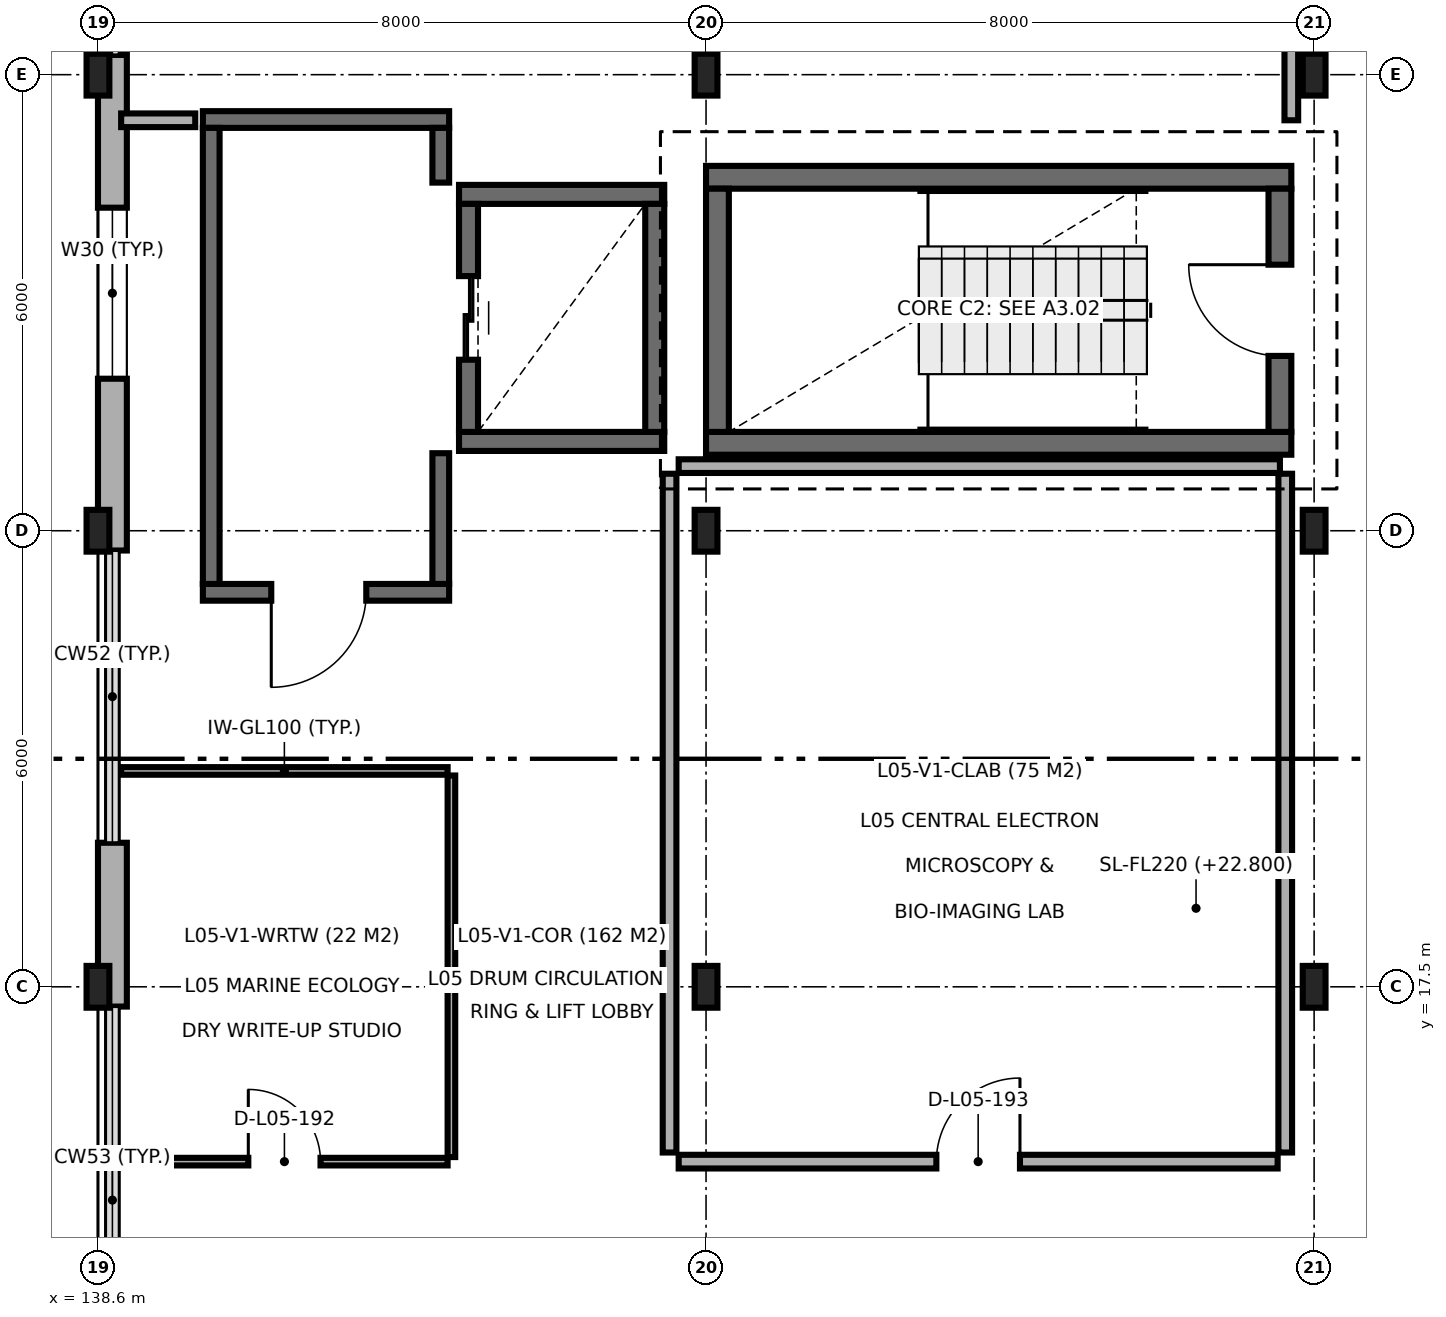
"""IFC4 building model, lengths in metres.
Left out: names, types, materials, properties, quantities, classifications, styles, units other than length and angle.
Written with IfcOpenShell. Run it as: python <this file> out.ifc"""

import sys

from ifc_helpers import new_model, si_unit, direction, frame, frame_2d, origin, origin_2d, place, context, subcontext, project, spatial, rectangle, i_section, extrude, element, fill, save


model = new_model("IFC4")
c1 = context("Model", 3, precision=1e-05, world=origin(), true_north=direction((0.0, 1.0)))
c2 = subcontext(c1, "Body", "Model", "MODEL_VIEW")
j1 = project(units=[si_unit("LENGTHUNIT", "METRE"), si_unit("PLANEANGLEUNIT", "RADIAN")], contexts=[c1])
p1 = place(None, origin())
s1 = spatial("IfcSite", under=j1, at=p1, CompositionType="ELEMENT")
p2 = place(p1, origin())
s2 = spatial("IfcBuilding", under=s1, at=p2, CompositionType="ELEMENT")
p3 = place(p2, frame((0.0, 0.0, 22.8)))
s3 = spatial("IfcBuildingStorey", under=s2, at=p3, CompositionType="ELEMENT", Elevation=22.8)
for number, where, z_axis, x_axis in (
    (1, (138.6, 17.5, 0.0), (0.0, 0.0, 1.0), (1.0, 0.0, 0.0)),
    (2, (138.6, 23.5, 0.0), (0.0, 0.0, 1.0), (1.0, 0.0, 0.0)),
    (3, (138.6, 29.5, 0.0), (0.0, 0.0, 1.0), (1.0, 0.0, 0.0)),
    (4, (146.6, 17.5, 0.0), (0.0, 0.0, 1.0), (1.0, 0.0, 0.0)),
    (5, (146.6, 23.5, 0.0), (0.0, 0.0, 1.0), (1.0, 0.0, 0.0)),
    (6, (146.6, 29.5, 0.0), (0.0, 0.0, 1.0), (1.0, 0.0, 0.0)),
    (7, (154.6, 17.5, 0.0), (0.0, 0.0, 1.0), (1.0, 0.0, 0.0)),
    (8, (154.6, 23.5, 0.0), (0.0, 0.0, 1.0), (1.0, 0.0, 0.0)),
    (9, (154.6, 29.5, 0.0), (0.0, 0.0, 1.0), (1.0, 0.0, 0.0)),
):
    element("IfcColumn", number, at=place(p3, frame(where, z_axis=z_axis, x_axis=x_axis)), inside=s3, PredefinedType="COLUMN", context=c2, shape_type="SweptSolid", body=[
        extrude(i_section(OverallWidth=0.3, OverallDepth=0.55, WebThickness=0.015, FlangeThickness=0.029, FilletRadius=0.027, at=origin_2d()), origin(), (0.0, 0.0, 1.0), 3.9),
    ])
for number, where, z_axis, x_axis in (
    (10, (146.6, 24.65, 0.0), (0.0, 0.0, 1.0), (1.0, 0.0, 0.0)),
    (11, (154.3, 28.15, 0.0), (0.0, 0.0, 1.0), (-1.0, 0.0, 0.0)),
):
    element("IfcWall", number, at=place(p3, frame(where, z_axis=z_axis, x_axis=x_axis)), inside=s3, PredefinedType="SHEAR", context=c2, shape_type="SweptSolid", body=[
        extrude(rectangle(XDim=7.7, YDim=0.3, at=frame_2d((3.85, 0.0))), origin(), (0.0, 0.0, 1.0), 3.9),
    ])
p4 = place(p3, frame((146.75, 28.0, 0.0), z_axis=(0.0, 0.0, 1.0), x_axis=(0.0, -1.0, 0.0)))
e12 = element("IfcWall", 12, at=p4, inside=s3, PredefinedType="SHEAR", context=c2, shape_type="SweptSolid", body=[
    extrude(rectangle(XDim=3.2, YDim=0.3, at=frame_2d((1.6, 0.0))), origin(), (0.0, 0.0, 1.0), 3.9),
])
p5 = place(p3, frame((154.15, 24.8, 0.0), z_axis=(0.0, 0.0, 1.0), x_axis=(0.0, 1.0, 0.0)))
e13 = element("IfcWall", 13, at=p5, inside=s3, PredefinedType="SHEAR", context=c2, shape_type="SweptSolid", body=[
    extrude(rectangle(XDim=3.2, YDim=0.3, at=frame_2d((1.6, 0.0))), origin(), (0.0, 0.0, 1.0), 3.9),
])
p6 = place(p5, frame((1.0, 0.0, 0.0)))
e14 = element("IfcOpeningElement", 14, at=p6, cuts=e13, PredefinedType="OPENING", context=c2, shape_type="SweptSolid", body=[
    extrude(rectangle(XDim=1.2, YDim=2.15, at=frame_2d((0.6, 1.075))), frame((0.0, 0.16, 0.0), z_axis=(0.0, -1.0, 0.0), x_axis=(1.0, 0.0, 0.0)), (0.0, 0.0, 1.0), 0.32),
])
for number, where, z_axis, x_axis in (
    (15, (143.35, 24.675, 0.0), (0.0, 0.0, 1.0), (1.0, 0.0, 0.0)),
    (16, (146.05, 27.925, 0.0), (0.0, 0.0, 1.0), (-1.0, 0.0, 0.0)),
):
    element("IfcWall", number, at=place(p3, frame(where, z_axis=z_axis, x_axis=x_axis)), inside=s3, PredefinedType="SHEAR", context=c2, shape_type="SweptSolid", body=[
        extrude(rectangle(XDim=2.7, YDim=0.25, at=frame_2d((1.35, 0.0))), origin(), (0.0, 0.0, 1.0), 3.9),
    ])
p7 = place(p3, frame((143.475, 27.8, 0.0), z_axis=(0.0, 0.0, 1.0), x_axis=(0.0, -1.0, 0.0)))
e17 = element("IfcWall", 17, at=p7, inside=s3, PredefinedType="SHEAR", context=c2, shape_type="SweptSolid", body=[
    extrude(rectangle(XDim=3.0, YDim=0.25, at=frame_2d((1.5, 0.0))), origin(), (0.0, 0.0, 1.0), 3.9),
])
p8 = place(p7, frame((0.95, 0.0, 0.0)))
e18 = element("IfcOpeningElement", 18, at=p8, cuts=e17, PredefinedType="OPENING", context=c2, shape_type="SweptSolid", body=[
    extrude(rectangle(XDim=1.1, YDim=2.15, at=frame_2d((0.55, 1.075))), frame((0.0, 0.135, 0.0), z_axis=(0.0, -1.0, 0.0), x_axis=(1.0, 0.0, 0.0)), (0.0, 0.0, 1.0), 0.27),
])
p9 = place(p3, frame((145.925, 24.8, 0.0), z_axis=(0.0, 0.0, 1.0), x_axis=(0.0, 1.0, 0.0)))
e19 = element("IfcWall", 19, at=p9, inside=s3, PredefinedType="SHEAR", context=c2, shape_type="SweptSolid", body=[
    extrude(rectangle(XDim=3.0, YDim=0.25, at=frame_2d((1.5, 0.0))), origin(), (0.0, 0.0, 1.0), 3.9),
])
p10 = place(p3, frame((139.98, 22.69, 0.0), z_axis=(0.0, 0.0, 1.0), x_axis=(1.0, 0.0, 0.0)))
e20 = element("IfcWall", 20, at=p10, inside=s3, PredefinedType="SOLIDWALL", context=c2, shape_type="SweptSolid", body=[
    extrude(rectangle(XDim=3.24, YDim=0.22, at=frame_2d((1.62, 0.0))), origin(), (0.0, 0.0, 1.0), 3.68),
])
p11 = place(p10, frame((0.9, 0.0, 0.0)))
e21 = element("IfcOpeningElement", 21, at=p11, cuts=e20, PredefinedType="OPENING", context=c2, shape_type="SweptSolid", body=[
    extrude(rectangle(XDim=1.25, YDim=2.15, at=frame_2d((0.625, 1.075))), frame((0.0, 0.12, 0.0), z_axis=(0.0, -1.0, 0.0), x_axis=(1.0, 0.0, 0.0)), (0.0, 0.0, 1.0), 0.24),
])
p12 = place(p3, frame((143.22, 28.91, 0.0), z_axis=(0.0, 0.0, 1.0), x_axis=(-1.0, 0.0, 0.0)))
e22 = element("IfcWall", 22, at=p12, inside=s3, PredefinedType="SOLIDWALL", context=c2, shape_type="SweptSolid", body=[
    extrude(rectangle(XDim=3.24, YDim=0.22, at=frame_2d((1.62, 0.0))), origin(), (0.0, 0.0, 1.0), 3.68),
])
p13 = place(p3, frame((140.09, 28.8, 0.0), z_axis=(0.0, 0.0, 1.0), x_axis=(0.0, -1.0, 0.0)))
e23 = element("IfcWall", 23, at=p13, inside=s3, PredefinedType="SOLIDWALL", context=c2, shape_type="SweptSolid", body=[
    extrude(rectangle(XDim=6.0, YDim=0.22, at=frame_2d((3.0, 0.0))), origin(), (0.0, 0.0, 1.0), 3.68),
])
p14 = place(p3, frame((143.11, 22.8, 0.0), z_axis=(0.0, 0.0, 1.0), x_axis=(0.0, 1.0, 0.0)))
e24 = element("IfcWall", 24, at=p14, inside=s3, PredefinedType="SOLIDWALL", context=c2, shape_type="SweptSolid", body=[
    extrude(rectangle(XDim=1.72, YDim=0.22, at=frame_2d((0.86, 0.0))), origin(), (0.0, 0.0, 1.0), 3.68),
])
p15 = place(p3, frame((143.11, 28.08, 0.0), z_axis=(0.0, 0.0, 1.0), x_axis=(0.0, 1.0, 0.0)))
e25 = element("IfcWall", 25, at=p15, inside=s3, PredefinedType="SOLIDWALL", context=c2, shape_type="SweptSolid", body=[
    extrude(rectangle(XDim=0.72, YDim=0.22, at=frame_2d((0.36, 0.0))), origin(), (0.0, 0.0, 1.0), 3.68),
])
p16 = place(p3, frame((138.79, 29.76, 0.0), z_axis=(0.0, 0.0, 1.0), x_axis=(0.0, -1.0, 0.0)))
e26 = element("IfcWall", 26, at=p16, inside=s3, PredefinedType="SOLIDWALL", context=c2, shape_type="SweptSolid", body=[
    extrude(rectangle(XDim=6.52, YDim=0.38, at=frame_2d((3.26, 0.0))), origin(), (0.0, 0.0, 1.0), 3.68),
])
p17 = place(p16, frame((2.01, 0.0, 0.9)))
e27 = element("IfcOpeningElement", 27, at=p17, cuts=e26, PredefinedType="OPENING", context=c2, shape_type="SweptSolid", body=[
    extrude(rectangle(XDim=2.25, YDim=1.95, at=frame_2d((1.125, 0.975))), frame((0.0, 0.2, 0.0), z_axis=(0.0, -1.0, 0.0), x_axis=(1.0, 0.0, 0.0)), (0.0, 0.0, 1.0), 0.4),
])
p18 = place(p3, frame((138.79, 19.395, 0.0), z_axis=(0.0, 0.0, 1.0), x_axis=(0.0, -1.0, 0.0)))
e28 = element("IfcWall", 28, at=p18, inside=s3, PredefinedType="SOLIDWALL", context=c2, shape_type="SweptSolid", body=[
    extrude(rectangle(XDim=2.155, YDim=0.38, at=frame_2d((1.078, 0.0))), origin(), (0.0, 0.0, 1.0), 3.68),
])
p19 = place(p3, frame((138.905, 20.34, 0.0), z_axis=(0.0, 0.0, 1.0), x_axis=(1.0, 0.0, 0.0)))
e29 = element("IfcWall", 29, at=p19, inside=s3, PredefinedType="PARTITIONING", context=c2, shape_type="SweptSolid", body=[
    extrude(rectangle(XDim=4.295, YDim=0.1, at=frame_2d((2.147, 0.0))), origin(), (0.0, 0.0, 1.0), 3.68),
])
p20 = place(p3, frame((143.25, 15.26, 0.0), z_axis=(0.0, 0.0, 1.0), x_axis=(0.0, 1.0, 0.0)))
e30 = element("IfcWall", 30, at=p20, inside=s3, PredefinedType="PARTITIONING", context=c2, shape_type="SweptSolid", body=[
    extrude(rectangle(XDim=5.02, YDim=0.1, at=frame_2d((2.51, 0.0))), origin(), (0.0, 0.0, 1.0), 3.68),
])
p21 = place(p3, frame((138.905, 15.2, 0.0), z_axis=(0.0, 0.0, 1.0), x_axis=(1.0, 0.0, 0.0)))
e31 = element("IfcWall", 31, at=p21, inside=s3, PredefinedType="PARTITIONING", context=c2, shape_type="SweptSolid", body=[
    extrude(rectangle(XDim=4.295, YDim=0.1, at=frame_2d((2.147, 0.0))), origin(), (0.0, 0.0, 1.0), 3.68),
])
p22 = place(p21, frame((1.673, 0.0, 0.0)))
e32 = element("IfcOpeningElement", 32, at=p22, cuts=e31, PredefinedType="OPENING", context=c2, shape_type="SweptSolid", body=[
    extrude(rectangle(XDim=0.95, YDim=2.1, at=frame_2d((0.475, 1.05))), frame((0.0, 0.06, 0.0), z_axis=(0.0, -1.0, 0.0), x_axis=(1.0, 0.0, 0.0)), (0.0, 0.0, 1.0), 0.12),
])
p23 = place(p3, frame((146.12, 15.32, 0.0), z_axis=(0.0, 0.0, 1.0), x_axis=(0.0, 1.0, 0.0)))
e33 = element("IfcWall", 33, at=p23, inside=s3, PredefinedType="PARTITIONING", context=c2, shape_type="SweptSolid", body=[
    extrude(rectangle(XDim=8.93, YDim=0.18, at=frame_2d((4.465, 0.0))), origin(), (0.0, 0.0, 1.0), 3.68),
])
p24 = place(p3, frame((146.24, 24.35, 0.0), z_axis=(0.0, 0.0, 1.0), x_axis=(1.0, 0.0, 0.0)))
e34 = element("IfcWall", 34, at=p24, inside=s3, PredefinedType="PARTITIONING", context=c2, shape_type="SweptSolid", body=[
    extrude(rectangle(XDim=7.91, YDim=0.18, at=frame_2d((3.955, 0.0))), origin(), (0.0, 0.0, 1.0), 2.86),
])
p25 = place(p3, frame((154.22, 15.32, 0.0), z_axis=(0.0, 0.0, 1.0), x_axis=(0.0, 1.0, 0.0)))
e35 = element("IfcWall", 35, at=p25, inside=s3, PredefinedType="PARTITIONING", context=c2, shape_type="SweptSolid", body=[
    extrude(rectangle(XDim=8.93, YDim=0.18, at=frame_2d((4.465, 0.0))), origin(), (0.0, 0.0, 1.0), 3.68),
])
p26 = place(p3, frame((146.24, 15.2, 0.0), z_axis=(0.0, 0.0, 1.0), x_axis=(1.0, 0.0, 0.0)))
e36 = element("IfcWall", 36, at=p26, inside=s3, PredefinedType="PARTITIONING", context=c2, shape_type="SweptSolid", body=[
    extrude(rectangle(XDim=7.88, YDim=0.18, at=frame_2d((3.94, 0.0))), origin(), (0.0, 0.0, 1.0), 3.68),
])
p27 = place(p26, frame((3.39, 0.0, 0.0)))
e37 = element("IfcOpeningElement", 37, at=p27, cuts=e36, PredefinedType="OPENING", context=c2, shape_type="SweptSolid", body=[
    extrude(rectangle(XDim=1.1, YDim=2.15, at=frame_2d((0.55, 1.075))), frame((0.0, 0.1, 0.0), z_axis=(0.0, -1.0, 0.0), x_axis=(1.0, 0.0, 0.0)), (0.0, 0.0, 1.0), 0.2),
])
p28 = place(p3, frame((138.905, 28.9, 0.0), z_axis=(0.0, 0.0, 1.0), x_axis=(1.0, 0.0, 0.0)))
e38 = element("IfcWall", 38, at=p28, inside=s3, PredefinedType="PARTITIONING", context=c2, shape_type="SweptSolid", body=[
    extrude(rectangle(XDim=0.975, YDim=0.18, at=frame_2d((0.487, 0.0))), origin(), (0.0, 0.0, 1.0), 3.68),
])
p29 = place(p3, frame((154.3, 28.9, 0.0), z_axis=(0.0, 0.0, 1.0), x_axis=(0.0, 1.0, 0.0)))
e39 = element("IfcWall", 39, at=p29, inside=s3, PredefinedType="PARTITIONING", context=c2, shape_type="SweptSolid", body=[
    extrude(rectangle(XDim=12.295, YDim=0.18, at=frame_2d((6.147, 0.0))), origin(), (0.0, 0.0, 1.0), 3.29),
])
p30 = place(p29, frame((3.918, 0.0, 0.0)))
e40 = element("IfcOpeningElement", 40, at=p30, cuts=e39, PredefinedType="OPENING", context=c2, shape_type="SweptSolid", body=[
    extrude(rectangle(XDim=1.1, YDim=2.15, at=frame_2d((0.55, 1.075))), frame((0.0, 0.1, 0.0), z_axis=(0.0, -1.0, 0.0), x_axis=(1.0, 0.0, 0.0)), (0.0, 0.0, 1.0), 0.2),
])
p31 = place(p6, origin())
e41 = element("IfcDoor", 41, at=p31, inside=s3, OperationType="SINGLE_SWING_RIGHT", PredefinedType="DOOR", context=c2, shape_type="SweptSolid", body=[
    extrude(rectangle(XDim=1.2, YDim=2.15, at=frame_2d((0.6, 1.075))), frame((0.0, 0.025, 0.0), z_axis=(0.0, -1.0, 0.0), x_axis=(1.0, 0.0, 0.0)), (0.0, 0.0, 1.0), 0.05),
])
fill(e14, e41)
p32 = place(p8, origin())
e42 = element("IfcDoor", 42, at=p32, inside=s3, OperationType="DOUBLE_DOOR_SLIDING", PredefinedType="DOOR", context=c2, shape_type="SweptSolid", body=[
    extrude(rectangle(XDim=1.1, YDim=2.15, at=frame_2d((0.55, 1.075))), frame((0.0, 0.025, 0.0), z_axis=(0.0, -1.0, 0.0), x_axis=(1.0, 0.0, 0.0)), (0.0, 0.0, 1.0), 0.05),
])
fill(e18, e42)
p33 = place(p11, frame((1.25, 0.0, 0.0), z_axis=(0.0, 0.0, 1.0), x_axis=(-1.0, 0.0, 0.0)))
e43 = element("IfcDoor", 43, at=p33, inside=s3, OperationType="SINGLE_SWING_LEFT", PredefinedType="DOOR", context=c2, shape_type="SweptSolid", body=[
    extrude(rectangle(XDim=1.25, YDim=2.15, at=frame_2d((0.625, 1.075))), frame((0.0, 0.025, 0.0), z_axis=(0.0, -1.0, 0.0), x_axis=(1.0, 0.0, 0.0)), (0.0, 0.0, 1.0), 0.05),
])
fill(e21, e43)
p34 = place(p17, origin())
e44 = element("IfcWindow", 44, at=p34, inside=s3, PartitioningType="SINGLE_PANEL", PredefinedType="WINDOW", context=c2, shape_type="SweptSolid", body=[
    extrude(rectangle(XDim=2.25, YDim=1.95, at=frame_2d((1.125, 0.975))), frame((0.0, 0.03, 0.0), z_axis=(0.0, -1.0, 0.0), x_axis=(1.0, 0.0, 0.0)), (0.0, 0.0, 1.0), 0.06),
])
fill(e27, e44)
p35 = place(p22, origin())
e45 = element("IfcDoor", 45, at=p35, inside=s3, OperationType="SINGLE_SWING_LEFT", PredefinedType="DOOR", context=c2, shape_type="SweptSolid", body=[
    extrude(rectangle(XDim=0.95, YDim=2.1, at=frame_2d((0.475, 1.05))), frame((0.0, 0.025, 0.0), z_axis=(0.0, -1.0, 0.0), x_axis=(1.0, 0.0, 0.0)), (0.0, 0.0, 1.0), 0.05),
])
fill(e32, e45)
p36 = place(p27, origin())
e46 = element("IfcDoor", 46, at=p36, inside=s3, OperationType="SINGLE_SWING_RIGHT", PredefinedType="DOOR", context=c2, shape_type="SweptSolid", body=[
    extrude(rectangle(XDim=1.1, YDim=2.15, at=frame_2d((0.55, 1.075))), frame((0.0, 0.025, 0.0), z_axis=(0.0, -1.0, 0.0), x_axis=(1.0, 0.0, 0.0)), (0.0, 0.0, 1.0), 0.05),
])
fill(e37, e46)
save(model, sys.argv[1])
